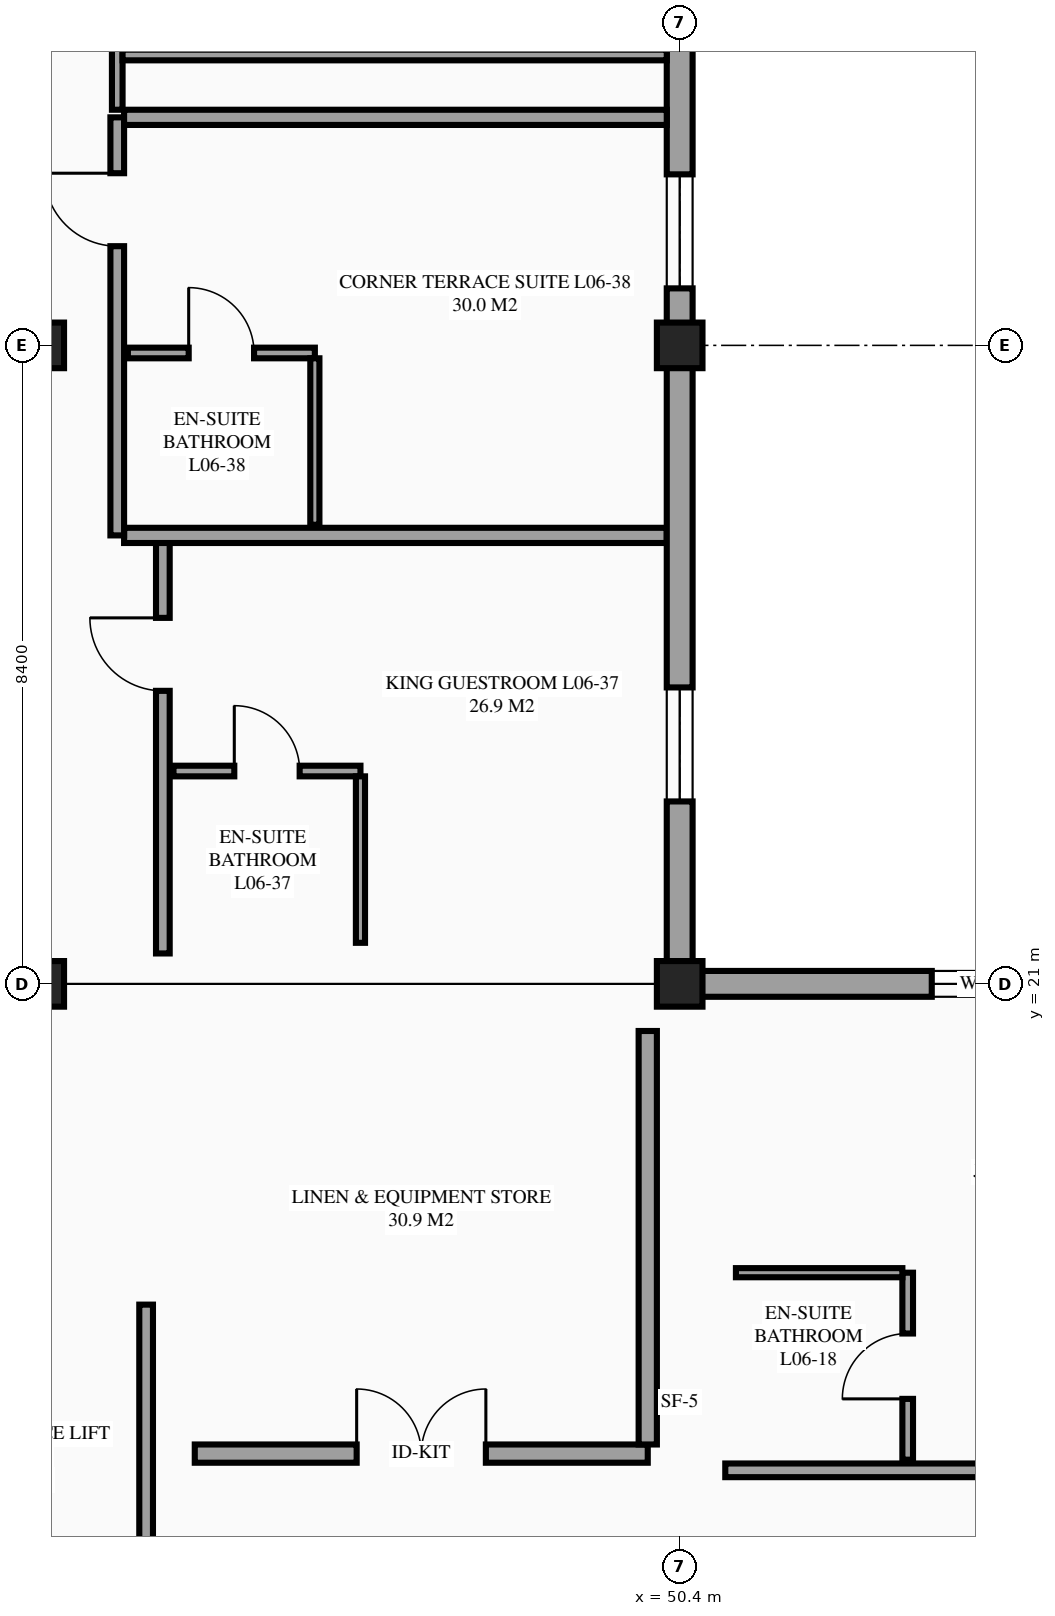
"""IFC4 building model, lengths in metres.
Left out: names, types, materials, properties, quantities, classifications, styles, units other than length and angle.
Written with IfcOpenShell. Run it as: python <this file> out.ifc"""

import sys

from ifc_helpers import new_model, si_unit, direction, frame, frame_2d, origin, origin_2d, place, context, subcontext, project, spatial, rectangle, extrude, element, fill, save


model = new_model("IFC4")
c1 = context("Model", 3, precision=1e-05, world=origin(), true_north=direction((0.0, 1.0)))
c2 = subcontext(c1, "Body", "Model", "MODEL_VIEW")
j1 = project(units=[si_unit("LENGTHUNIT", "METRE"), si_unit("PLANEANGLEUNIT", "RADIAN")], contexts=[c1])
p1 = place(None, origin())
s1 = spatial("IfcSite", under=j1, at=p1, CompositionType="ELEMENT")
p2 = place(p1, origin())
s2 = spatial("IfcBuilding", under=s1, at=p2, CompositionType="ELEMENT")
p3 = place(p2, frame((0.0, 0.0, 25.5)))
s3 = spatial("IfcBuildingStorey", under=s2, at=p3, CompositionType="ELEMENT", Elevation=25.5)
for number, where, z_axis, x_axis in (
    (1, (42.0, 21.0, 0.0), (0.0, 0.0, 1.0), (1.0, 0.0, 0.0)),
    (2, (42.0, 29.4, 0.0), (0.0, 0.0, 1.0), (1.0, 0.0, 0.0)),
    (3, (50.4, 21.0, 0.0), (0.0, 0.0, 1.0), (1.0, 0.0, 0.0)),
    (4, (50.4, 29.4, 0.0), (0.0, 0.0, 1.0), (1.0, 0.0, 0.0)),
):
    element("IfcColumn", number, at=place(p3, frame(where, z_axis=z_axis, x_axis=x_axis)), inside=s3, PredefinedType="COLUMN", context=c2, shape_type="SweptSolid", body=[
        extrude(rectangle(XDim=0.6, YDim=0.6, at=origin_2d()), origin(), (0.0, 0.0, 1.0), 3.6),
    ])
p4 = place(p3, frame((67.2, 21.0, 0.0), z_axis=(0.0, 0.0, 1.0), x_axis=(-1.0, 0.0, 0.0)))
e5 = element("IfcWall", 5, at=p4, inside=s3, PredefinedType="STANDARD", context=c2, shape_type="SweptSolid", body=[
    extrude(rectangle(XDim=16.8, YDim=0.34, at=frame_2d((8.4, 0.0))), origin(), (0.0, 0.0, 1.0), 2.43),
])
p5 = place(p4, frame((11.983, 0.0, 0.85)))
e6 = element("IfcOpeningElement", 6, at=p5, cuts=e5, PredefinedType="OPENING", context=c2, shape_type="SweptSolid", body=[
    extrude(rectangle(XDim=1.5, YDim=1.5, at=frame_2d((0.75, 0.75))), frame((0.0, 0.18, 0.0), z_axis=(0.0, -1.0, 0.0), x_axis=(1.0, 0.0, 0.0)), (0.0, 0.0, 1.0), 0.36),
])
p6 = place(p4, frame((5.05, 0.0, 0.85)))
e7 = element("IfcOpeningElement", 7, at=p6, cuts=e5, PredefinedType="OPENING", context=c2, shape_type="SweptSolid", body=[
    extrude(rectangle(XDim=1.5, YDim=1.5, at=frame_2d((0.75, 0.75))), frame((0.0, 0.18, 0.0), z_axis=(0.0, -1.0, 0.0), x_axis=(1.0, 0.0, 0.0)), (0.0, 0.0, 1.0), 0.36),
])
p7 = place(p3, frame((50.4, 29.4, 0.0), z_axis=(0.0, 0.0, 1.0), x_axis=(0.0, 1.0, 0.0)))
e8 = element("IfcWall", 8, at=p7, inside=s3, PredefinedType="STANDARD", context=c2, shape_type="SweptSolid", body=[
    extrude(rectangle(XDim=16.8, YDim=0.34, at=frame_2d((8.4, 0.0))), origin(), (0.0, 0.0, 1.0), 2.48),
])
p8 = place(p7, frame((0.75, 0.0, 0.85)))
e9 = element("IfcOpeningElement", 9, at=p8, cuts=e8, PredefinedType="OPENING", context=c2, shape_type="SweptSolid", body=[
    extrude(rectangle(XDim=1.5, YDim=1.5, at=frame_2d((0.75, 0.75))), frame((0.0, 0.18, 0.0), z_axis=(0.0, -1.0, 0.0), x_axis=(1.0, 0.0, 0.0)), (0.0, 0.0, 1.0), 0.36),
])
p9 = place(p7, frame((10.4, 0.0, 0.85)))
e10 = element("IfcOpeningElement", 10, at=p9, cuts=e8, PredefinedType="OPENING", context=c2, shape_type="SweptSolid", body=[
    extrude(rectangle(XDim=1.2, YDim=1.5, at=frame_2d((0.6, 0.75))), frame((0.0, 0.18, 0.0), z_axis=(0.0, -1.0, 0.0), x_axis=(1.0, 0.0, 0.0)), (0.0, 0.0, 1.0), 0.36),
])
p10 = place(p3, frame((51.0, 14.6, 0.0), z_axis=(0.0, 0.0, 1.0), x_axis=(1.0, 0.0, 0.0)))
e11 = element("IfcWall", 11, at=p10, inside=s3, PredefinedType="PARTITIONING", context=c2, shape_type="SweptSolid", body=[
    extrude(rectangle(XDim=6.933, YDim=0.18, at=frame_2d((3.467, 0.0))), origin(), (0.0, 0.0, 1.0), 3.375),
])
p11 = place(p10, frame((4.686, 0.0, 0.0)))
e12 = element("IfcOpeningElement", 12, at=p11, cuts=e11, PredefinedType="OPENING", context=c2, shape_type="SweptSolid", body=[
    extrude(rectangle(XDim=0.96, YDim=2.15, at=frame_2d((0.48, 1.075))), frame((0.0, 0.1, 0.0), z_axis=(0.0, -1.0, 0.0), x_axis=(1.0, 0.0, 0.0)), (0.0, 0.0, 1.0), 0.2),
])
p12 = place(p3, frame((53.4, 14.74, 0.0), z_axis=(0.0, 0.0, 1.0), x_axis=(0.0, 1.0, 0.0)))
e13 = element("IfcWall", 13, at=p12, inside=s3, PredefinedType="PARTITIONING", context=c2, shape_type="SweptSolid", body=[
    extrude(rectangle(XDim=2.46, YDim=0.14, at=frame_2d((1.23, 0.0))), origin(), (0.0, 0.0, 1.0), 3.375),
])
p13 = place(p12, frame((0.8, 0.0, 0.0)))
e14 = element("IfcOpeningElement", 14, at=p13, cuts=e13, PredefinedType="OPENING", context=c2, shape_type="SweptSolid", body=[
    extrude(rectangle(XDim=0.86, YDim=2.1, at=frame_2d((0.43, 1.05))), frame((0.0, 0.08, 0.0), z_axis=(0.0, -1.0, 0.0), x_axis=(1.0, 0.0, 0.0)), (0.0, 0.0, 1.0), 0.16),
])
p14 = place(p3, frame((51.14, 17.2, 0.0), z_axis=(0.0, 0.0, 1.0), x_axis=(1.0, 0.0, 0.0)))
e15 = element("IfcWall", 15, at=p14, inside=s3, PredefinedType="PARTITIONING", context=c2, shape_type="SweptSolid", body=[
    extrude(rectangle(XDim=2.19, YDim=0.12, at=frame_2d((1.095, 0.0))), origin(), (0.0, 0.0, 1.0), 3.375),
])
p15 = place(p3, frame((43.6, 21.4, 0.0), z_axis=(0.0, 0.0, 1.0), x_axis=(0.0, 1.0, 0.0)))
e16 = element("IfcWall", 16, at=p15, inside=s3, PredefinedType="PARTITIONING", context=c2, shape_type="SweptSolid", body=[
    extrude(rectangle(XDim=5.5, YDim=0.18, at=frame_2d((2.75, 0.0))), origin(), (0.0, 0.0, 1.0), 3.375),
])
p16 = place(p15, frame((3.455, 0.0, 0.0)))
e17 = element("IfcOpeningElement", 17, at=p16, cuts=e16, PredefinedType="OPENING", context=c2, shape_type="SweptSolid", body=[
    extrude(rectangle(XDim=0.96, YDim=2.15, at=frame_2d((0.48, 1.075))), frame((0.0, 0.1, 0.0), z_axis=(0.0, -1.0, 0.0), x_axis=(1.0, 0.0, 0.0)), (0.0, 0.0, 1.0), 0.2),
])
p17 = place(p3, frame((43.09, 26.9, 0.0), z_axis=(0.0, 0.0, 1.0), x_axis=(1.0, 0.0, 0.0)))
e18 = element("IfcWall", 18, at=p17, inside=s3, PredefinedType="PARTITIONING", context=c2, shape_type="SweptSolid", body=[
    extrude(rectangle(XDim=7.14, YDim=0.2, at=frame_2d((3.57, 0.0))), origin(), (0.0, 0.0, 1.0), 3.375),
])
p18 = place(p3, frame((43.74, 23.8, 0.0), z_axis=(0.0, 0.0, 1.0), x_axis=(1.0, 0.0, 0.0)))
e19 = element("IfcWall", 19, at=p18, inside=s3, PredefinedType="PARTITIONING", context=c2, shape_type="SweptSolid", body=[
    extrude(rectangle(XDim=2.46, YDim=0.14, at=frame_2d((1.23, 0.0))), origin(), (0.0, 0.0, 1.0), 3.375),
])
p19 = place(p18, frame((0.8, 0.0, 0.0)))
e20 = element("IfcOpeningElement", 20, at=p19, cuts=e19, PredefinedType="OPENING", context=c2, shape_type="SweptSolid", body=[
    extrude(rectangle(XDim=0.86, YDim=2.1, at=frame_2d((0.43, 1.05))), frame((0.0, 0.08, 0.0), z_axis=(0.0, -1.0, 0.0), x_axis=(1.0, 0.0, 0.0)), (0.0, 0.0, 1.0), 0.16),
])
p20 = place(p3, frame((46.2, 21.54, 0.0), z_axis=(0.0, 0.0, 1.0), x_axis=(0.0, 1.0, 0.0)))
e21 = element("IfcWall", 21, at=p20, inside=s3, PredefinedType="PARTITIONING", context=c2, shape_type="SweptSolid", body=[
    extrude(rectangle(XDim=2.19, YDim=0.12, at=frame_2d((1.095, 0.0))), origin(), (0.0, 0.0, 1.0), 3.375),
])
p21 = place(p3, frame((43.0, 26.9, 0.0), z_axis=(0.0, 0.0, 1.0), x_axis=(0.0, 1.0, 0.0)))
e22 = element("IfcWall", 22, at=p21, inside=s3, PredefinedType="PARTITIONING", context=c2, shape_type="SweptSolid", body=[
    extrude(rectangle(XDim=5.5, YDim=0.18, at=frame_2d((2.75, 0.0))), origin(), (0.0, 0.0, 1.0), 3.375),
])
p22 = place(p21, frame((3.805, 0.0, 0.0)))
e23 = element("IfcOpeningElement", 23, at=p22, cuts=e22, PredefinedType="OPENING", context=c2, shape_type="SweptSolid", body=[
    extrude(rectangle(XDim=0.96, YDim=2.15, at=frame_2d((0.48, 1.075))), frame((0.0, 0.1, 0.0), z_axis=(0.0, -1.0, 0.0), x_axis=(1.0, 0.0, 0.0)), (0.0, 0.0, 1.0), 0.2),
])
p23 = place(p3, frame((43.09, 32.4, 0.0), z_axis=(0.0, 0.0, 1.0), x_axis=(1.0, 0.0, 0.0)))
e24 = element("IfcWall", 24, at=p23, inside=s3, PredefinedType="PARTITIONING", context=c2, shape_type="SweptSolid", body=[
    extrude(rectangle(XDim=7.14, YDim=0.2, at=frame_2d((3.57, 0.0))), origin(), (0.0, 0.0, 1.0), 3.375),
])
p24 = place(p3, frame((43.14, 29.3, 0.0), z_axis=(0.0, 0.0, 1.0), x_axis=(1.0, 0.0, 0.0)))
e25 = element("IfcWall", 25, at=p24, inside=s3, PredefinedType="PARTITIONING", context=c2, shape_type="SweptSolid", body=[
    extrude(rectangle(XDim=2.46, YDim=0.14, at=frame_2d((1.23, 0.0))), origin(), (0.0, 0.0, 1.0), 2.58),
])
p25 = place(p24, frame((0.8, 0.0, 0.0)))
e26 = element("IfcOpeningElement", 26, at=p25, cuts=e25, PredefinedType="OPENING", context=c2, shape_type="SweptSolid", body=[
    extrude(rectangle(XDim=0.86, YDim=2.1, at=frame_2d((0.43, 1.05))), frame((0.0, 0.08, 0.0), z_axis=(0.0, -1.0, 0.0), x_axis=(1.0, 0.0, 0.0)), (0.0, 0.0, 1.0), 0.16),
])
p26 = place(p3, frame((45.6, 27.04, 0.0), z_axis=(0.0, 0.0, 1.0), x_axis=(0.0, 1.0, 0.0)))
e27 = element("IfcWall", 27, at=p26, inside=s3, PredefinedType="PARTITIONING", context=c2, shape_type="SweptSolid", body=[
    extrude(rectangle(XDim=2.19, YDim=0.12, at=frame_2d((1.095, 0.0))), origin(), (0.0, 0.0, 1.0), 3.375),
])
p27 = place(p3, frame((43.38, 12.91, 0.0), z_axis=(0.0, 0.0, 1.0), x_axis=(0.0, 1.0, 0.0)))
e28 = element("IfcWall", 28, at=p27, inside=s3, PredefinedType="PARTITIONING", context=c2, shape_type="SweptSolid", body=[
    extrude(rectangle(XDim=3.87, YDim=0.18, at=frame_2d((1.935, 0.0))), origin(), (0.0, 0.0, 1.0), 3.375),
])
p28 = place(p3, frame((44.02, 14.82, 0.0), z_axis=(0.0, 0.0, 1.0), x_axis=(1.0, 0.0, 0.0)))
e29 = element("IfcWall", 29, at=p28, inside=s3, PredefinedType="PARTITIONING", context=c2, shape_type="SweptSolid", body=[
    extrude(rectangle(XDim=5.96, YDim=0.24, at=frame_2d((2.98, 0.0))), origin(), (0.0, 0.0, 1.0), 3.375),
])
p29 = place(p28, frame((2.13, 0.0, 0.0)))
e30 = element("IfcOpeningElement", 30, at=p29, cuts=e29, PredefinedType="OPENING", context=c2, shape_type="SweptSolid", body=[
    extrude(rectangle(XDim=1.7, YDim=2.2, at=frame_2d((0.85, 1.1))), frame((0.0, 0.13, 0.0), z_axis=(0.0, -1.0, 0.0), x_axis=(1.0, 0.0, 0.0)), (0.0, 0.0, 1.0), 0.26),
])
p30 = place(p3, frame((49.98, 14.94, 0.0), z_axis=(0.0, 0.0, 1.0), x_axis=(0.0, 1.0, 0.0)))
e31 = element("IfcWall", 31, at=p30, inside=s3, PredefinedType="PARTITIONING", context=c2, shape_type="SweptSolid", body=[
    extrude(rectangle(XDim=5.44, YDim=0.24, at=frame_2d((2.72, 0.0))), origin(), (0.0, 0.0, 1.0), 3.375),
])
p31 = place(p3, frame((43.0, 32.5, 0.0), z_axis=(0.0, 0.0, 1.0), x_axis=(0.0, 1.0, 0.0)))
e32 = element("IfcWall", 32, at=p31, inside=s3, PredefinedType="PARTITIONING", context=c2, shape_type="SweptSolid", body=[
    extrude(rectangle(XDim=4.8, YDim=0.14, at=frame_2d((2.4, 0.0))), origin(), (0.0, 0.0, 1.0), 3.375),
])
p32 = place(p31, frame((2.05, 0.0, 0.0)))
e33 = element("IfcOpeningElement", 33, at=p32, cuts=e32, PredefinedType="OPENING", context=c2, shape_type="SweptSolid", body=[
    extrude(rectangle(XDim=0.9, YDim=2.12, at=frame_2d((0.45, 1.06))), frame((0.0, 0.08, 0.0), z_axis=(0.0, -1.0, 0.0), x_axis=(1.0, 0.0, 0.0)), (0.0, 0.0, 1.0), 0.16),
])
p33 = place(p3, frame((43.07, 33.22, 0.0), z_axis=(0.0, 0.0, 1.0), x_axis=(1.0, 0.0, 0.0)))
e34 = element("IfcWall", 34, at=p33, inside=s3, PredefinedType="PARTITIONING", context=c2, shape_type="SweptSolid", body=[
    extrude(rectangle(XDim=7.16, YDim=0.14, at=frame_2d((3.58, 0.0))), origin(), (0.0, 0.0, 1.0), 3.375),
])
p34 = place(p3, frame((50.4, 21.0, 0.0), z_axis=(0.0, 0.0, 1.0), x_axis=(0.0, 1.0, 0.0)))
e35 = element("IfcWall", 35, at=p34, inside=s3, PredefinedType="STANDARD", context=c2, shape_type="SweptSolid", body=[
    extrude(rectangle(XDim=8.4, YDim=0.34, at=frame_2d((4.2, 0.0))), origin(), (0.0, 0.0, 1.0), 2.88),
])
p35 = place(p34, frame((2.4, 0.0, 0.85)))
e36 = element("IfcOpeningElement", 36, at=p35, cuts=e35, PredefinedType="OPENING", context=c2, shape_type="SweptSolid", body=[
    extrude(rectangle(XDim=1.5, YDim=1.5, at=frame_2d((0.75, 0.75))), frame((0.0, 0.18, 0.0), z_axis=(0.0, -1.0, 0.0), x_axis=(1.0, 0.0, 0.0)), (0.0, 0.0, 1.0), 0.36),
])
p36 = place(p5, origin())
e37 = element("IfcWindow", 37, at=p36, inside=s3, PartitioningType="SINGLE_PANEL", PredefinedType="WINDOW", context=c2, shape_type="SweptSolid", body=[
    extrude(rectangle(XDim=1.5, YDim=1.5, at=frame_2d((0.75, 0.75))), frame((0.0, 0.03, 0.0), z_axis=(0.0, -1.0, 0.0), x_axis=(1.0, 0.0, 0.0)), (0.0, 0.0, 1.0), 0.06),
])
fill(e6, e37)
p37 = place(p35, origin())
e38 = element("IfcWindow", 38, at=p37, inside=s3, PartitioningType="SINGLE_PANEL", PredefinedType="WINDOW", context=c2, shape_type="SweptSolid", body=[
    extrude(rectangle(XDim=1.5, YDim=1.5, at=frame_2d((0.75, 0.75))), frame((0.0, 0.03, 0.0), z_axis=(0.0, -1.0, 0.0), x_axis=(1.0, 0.0, 0.0)), (0.0, 0.0, 1.0), 0.06),
])
fill(e36, e38)
p38 = place(p8, origin())
e39 = element("IfcWindow", 39, at=p38, inside=s3, PartitioningType="SINGLE_PANEL", PredefinedType="WINDOW", context=c2, shape_type="SweptSolid", body=[
    extrude(rectangle(XDim=1.5, YDim=1.5, at=frame_2d((0.75, 0.75))), frame((0.0, 0.03, 0.0), z_axis=(0.0, -1.0, 0.0), x_axis=(1.0, 0.0, 0.0)), (0.0, 0.0, 1.0), 0.06),
])
fill(e9, e39)
p39 = place(p13, origin())
e40 = element("IfcDoor", 40, at=p39, inside=s3, OperationType="SINGLE_SWING_LEFT", PredefinedType="DOOR", context=c2, shape_type="SweptSolid", body=[
    extrude(rectangle(XDim=0.86, YDim=2.1, at=frame_2d((0.43, 1.05))), frame((0.0, 0.025, 0.0), z_axis=(0.0, -1.0, 0.0), x_axis=(1.0, 0.0, 0.0)), (0.0, 0.0, 1.0), 0.05),
])
fill(e14, e40)
p40 = place(p16, origin())
e41 = element("IfcDoor", 41, at=p40, inside=s3, OperationType="SINGLE_SWING_RIGHT", PredefinedType="DOOR", context=c2, shape_type="SweptSolid", body=[
    extrude(rectangle(XDim=0.96, YDim=2.15, at=frame_2d((0.48, 1.075))), frame((0.0, 0.025, 0.0), z_axis=(0.0, -1.0, 0.0), x_axis=(1.0, 0.0, 0.0)), (0.0, 0.0, 1.0), 0.05),
])
fill(e17, e41)
p41 = place(p19, origin())
e42 = element("IfcDoor", 42, at=p41, inside=s3, OperationType="SINGLE_SWING_LEFT", PredefinedType="DOOR", context=c2, shape_type="SweptSolid", body=[
    extrude(rectangle(XDim=0.86, YDim=2.1, at=frame_2d((0.43, 1.05))), frame((0.0, 0.025, 0.0), z_axis=(0.0, -1.0, 0.0), x_axis=(1.0, 0.0, 0.0)), (0.0, 0.0, 1.0), 0.05),
])
fill(e20, e42)
p42 = place(p22, origin())
e43 = element("IfcDoor", 43, at=p42, inside=s3, OperationType="SINGLE_SWING_RIGHT", PredefinedType="DOOR", context=c2, shape_type="SweptSolid", body=[
    extrude(rectangle(XDim=0.96, YDim=2.15, at=frame_2d((0.48, 1.075))), frame((0.0, 0.025, 0.0), z_axis=(0.0, -1.0, 0.0), x_axis=(1.0, 0.0, 0.0)), (0.0, 0.0, 1.0), 0.05),
])
fill(e23, e43)
p43 = place(p25, origin())
e44 = element("IfcDoor", 44, at=p43, inside=s3, OperationType="SINGLE_SWING_LEFT", PredefinedType="DOOR", context=c2, shape_type="SweptSolid", body=[
    extrude(rectangle(XDim=0.86, YDim=2.1, at=frame_2d((0.43, 1.05))), frame((0.0, 0.025, 0.0), z_axis=(0.0, -1.0, 0.0), x_axis=(1.0, 0.0, 0.0)), (0.0, 0.0, 1.0), 0.05),
])
fill(e26, e44)
p44 = place(p29, origin())
e45 = element("IfcDoor", 45, at=p44, inside=s3, OperationType="DOUBLE_DOOR_SINGLE_SWING", PredefinedType="DOOR", context=c2, shape_type="SweptSolid", body=[
    extrude(rectangle(XDim=1.7, YDim=2.2, at=frame_2d((0.85, 1.1))), frame((0.0, 0.025, 0.0), z_axis=(0.0, -1.0, 0.0), x_axis=(1.0, 0.0, 0.0)), (0.0, 0.0, 1.0), 0.05),
])
fill(e30, e45)
save(model, sys.argv[1])
